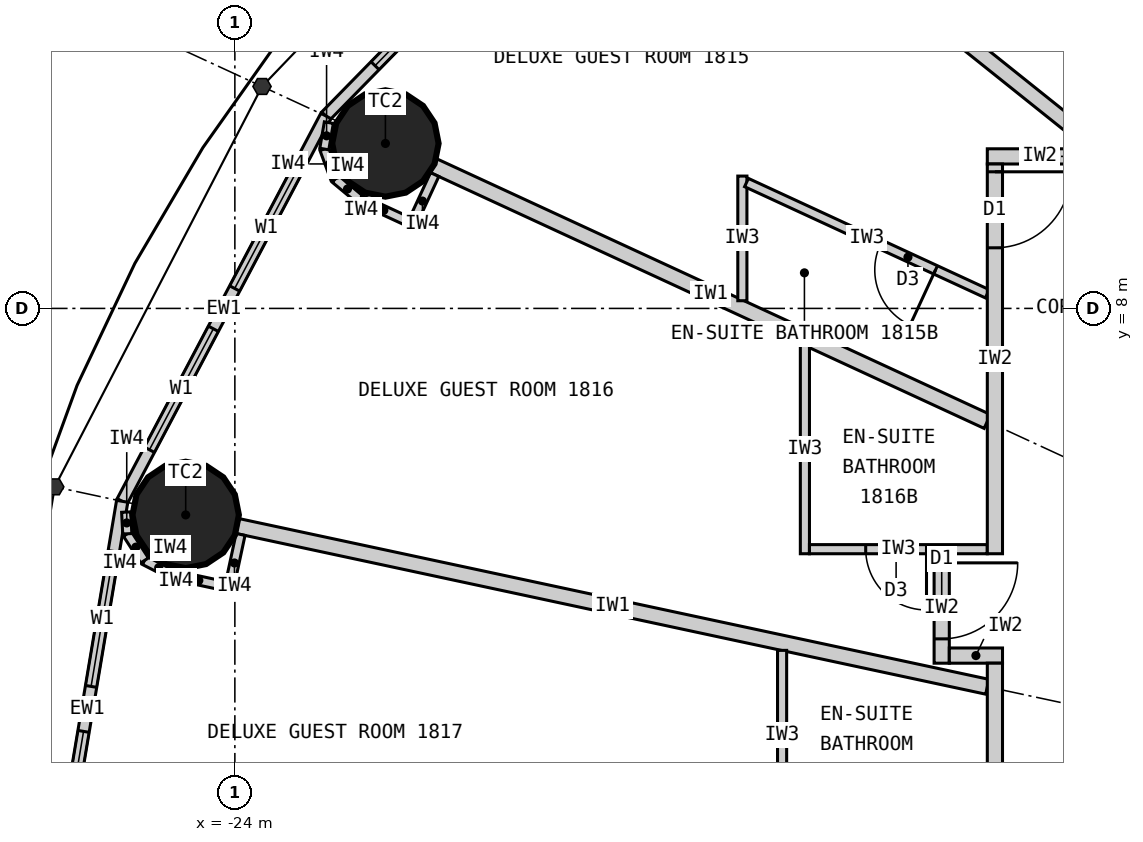
"""IFC4 building model, lengths in metres.
Left out: names, types, materials, properties, quantities, classifications, styles, units other than length and angle.
Written with IfcOpenShell. Run it as: python <this file> out.ifc"""

import sys

from ifc_helpers import new_model, si_unit, direction, frame, frame_2d, origin, origin_2d, place, context, subcontext, project, spatial, rectangle, circle, extrude, element, fill, save


model = new_model("IFC4")
c1 = context("Model", 3, precision=1e-05, world=origin(), true_north=direction((0.0, 1.0)))
c2 = subcontext(c1, "Body", "Model", "MODEL_VIEW")
j1 = project(units=[si_unit("LENGTHUNIT", "METRE"), si_unit("PLANEANGLEUNIT", "RADIAN")], contexts=[c1])
p1 = place(None, origin())
s1 = spatial("IfcSite", under=j1, at=p1, CompositionType="ELEMENT")
p2 = place(p1, origin())
s2 = spatial("IfcBuilding", under=s1, at=p2, CompositionType="ELEMENT")
p3 = place(p2, frame((0.0, 0.0, 73.8)))
s3 = spatial("IfcBuildingStorey", under=s2, at=p3, CompositionType="ELEMENT", Elevation=73.8)
for number, where, z_axis, x_axis in (
    (1, (-22.019, 10.17, 0.0), (0.0, 0.0, 1.0), (1.0, 0.0, 0.0)),
    (2, (-24.647, 5.283, 0.0), (0.0, 0.0, 1.0), (1.0, 0.0, 0.0)),
):
    element("IfcColumn", number, at=place(p3, frame(where, z_axis=z_axis, x_axis=x_axis)), inside=s3, PredefinedType="COLUMN", context=c2, shape_type="SweptSolid", body=[
        extrude(circle(Radius=0.7, at=origin_2d()), origin(), (0.0, 0.0, 1.0), 3.3),
    ])
p4 = place(p3, frame((-18.57, 14.856, 0.0), z_axis=(0.0, 0.0, 1.0), x_axis=(-0.699602905915, -0.714531856557, 0.0)))
e3 = element("IfcWall", 3, at=p4, inside=s3, PredefinedType="ELEMENTEDWALL", context=c2, shape_type="SweptSolid", body=[
    extrude(rectangle(XDim=6.051, YDim=0.15, at=frame_2d((3.025, 0.0))), origin(), (0.0, 0.0, 1.0), 3.12),
])
p5 = place(p4, frame((0.926, 0.0, 0.9)))
e4 = element("IfcOpeningElement", 4, at=p5, cuts=e3, PredefinedType="OPENING", context=c2, shape_type="SweptSolid", body=[
    extrude(rectangle(XDim=1.8, YDim=1.9, at=frame_2d((0.9, 0.95))), frame((0.0, 0.085, 0.0), z_axis=(0.0, -1.0, 0.0), x_axis=(1.0, 0.0, 0.0)), (0.0, 0.0, 1.0), 0.17),
])
p6 = place(p4, frame((3.325, 0.0, 0.9)))
e5 = element("IfcOpeningElement", 5, at=p6, cuts=e3, PredefinedType="OPENING", context=c2, shape_type="SweptSolid", body=[
    extrude(rectangle(XDim=1.8, YDim=1.9, at=frame_2d((0.9, 0.95))), frame((0.0, 0.085, 0.0), z_axis=(0.0, -1.0, 0.0), x_axis=(1.0, 0.0, 0.0)), (0.0, 0.0, 1.0), 0.17),
])
p7 = place(p3, frame((-22.803, 10.532, 0.0), z_axis=(0.0, 0.0, 1.0), x_axis=(-0.467296867008, -0.884100468321, 0.0)))
e6 = element("IfcWall", 6, at=p7, inside=s3, PredefinedType="ELEMENTEDWALL", context=c2, shape_type="SweptSolid", body=[
    extrude(rectangle(XDim=5.734, YDim=0.15, at=frame_2d((2.867, 0.0))), origin(), (0.0, 0.0, 1.0), 3.12),
])
p8 = place(p7, frame((0.767, 0.0, 0.9)))
e7 = element("IfcOpeningElement", 7, at=p8, cuts=e6, PredefinedType="OPENING", context=c2, shape_type="SweptSolid", body=[
    extrude(rectangle(XDim=1.8, YDim=1.9, at=frame_2d((0.9, 0.95))), frame((0.0, 0.085, 0.0), z_axis=(0.0, -1.0, 0.0), x_axis=(1.0, 0.0, 0.0)), (0.0, 0.0, 1.0), 0.17),
])
p9 = place(p7, frame((3.167, 0.0, 0.9)))
e8 = element("IfcOpeningElement", 8, at=p9, cuts=e6, PredefinedType="OPENING", context=c2, shape_type="SweptSolid", body=[
    extrude(rectangle(XDim=1.8, YDim=1.9, at=frame_2d((0.9, 0.95))), frame((0.0, 0.085, 0.0), z_axis=(0.0, -1.0, 0.0), x_axis=(1.0, 0.0, 0.0)), (0.0, 0.0, 1.0), 0.17),
])
p10 = place(p3, frame((-25.482, 5.462, 0.0), z_axis=(0.0, 0.0, 1.0), x_axis=(-0.165642551694, -0.986185857264, 0.0)))
e9 = element("IfcWall", 9, at=p10, inside=s3, PredefinedType="ELEMENTEDWALL", context=c2, shape_type="SweptSolid", body=[
    extrude(rectangle(XDim=5.539, YDim=0.15, at=frame_2d((2.77, 0.0))), origin(), (0.0, 0.0, 1.0), 3.12),
])
p11 = place(p10, frame((0.669, 0.0, 0.9)))
e10 = element("IfcOpeningElement", 10, at=p11, cuts=e9, PredefinedType="OPENING", context=c2, shape_type="SweptSolid", body=[
    extrude(rectangle(XDim=1.8, YDim=1.9, at=frame_2d((0.9, 0.95))), frame((0.0, 0.085, 0.0), z_axis=(0.0, -1.0, 0.0), x_axis=(1.0, 0.0, 0.0)), (0.0, 0.0, 1.0), 0.17),
])
p12 = place(p10, frame((3.07, 0.0, 0.9)))
e11 = element("IfcOpeningElement", 11, at=p12, cuts=e9, PredefinedType="OPENING", context=c2, shape_type="SweptSolid", body=[
    extrude(rectangle(XDim=1.8, YDim=1.9, at=frame_2d((0.9, 0.95))), frame((0.0, 0.085, 0.0), z_axis=(0.0, -1.0, 0.0), x_axis=(1.0, 0.0, 0.0)), (0.0, 0.0, 1.0), 0.17),
])
p13 = place(p3, frame((-12.625, 10.1, 0.0), z_axis=(0.0, 0.0, 1.0), x_axis=(-0.780892451574, 0.624665493744, 0.0)))
e12 = element("IfcWall", 12, at=p13, inside=s3, PredefinedType="PARTITIONING", context=c2, shape_type="SweptSolid", body=[
    extrude(rectangle(XDim=6.045, YDim=0.2, at=frame_2d((3.022, 0.0))), origin(), (0.0, 0.0, 1.0), 2.32),
])
p14 = place(p3, frame((-14.1, 6.512, 0.0), z_axis=(0.0, 0.0, 1.0), x_axis=(-0.907832871056, 0.419332181247, 0.0)))
e13 = element("IfcWall", 13, at=p14, inside=s3, PredefinedType="PARTITIONING", context=c2, shape_type="SweptSolid", body=[
    extrude(rectangle(XDim=8.023, YDim=0.2, at=frame_2d((4.011, 0.0))), origin(), (0.0, 0.0, 1.0), 2.32),
])
p15 = place(p3, frame((-14.1, 3.022, 0.0), z_axis=(0.0, 0.0, 1.0), x_axis=(-0.977790014929, 0.209586943072, 0.0)))
e14 = element("IfcWall", 14, at=p15, inside=s3, PredefinedType="PARTITIONING", context=c2, shape_type="SweptSolid", body=[
    extrude(rectangle(XDim=10.087, YDim=0.2, at=frame_2d((5.043, 0.0))), origin(), (0.0, 0.0, 1.0), 2.32),
])
p16 = place(p3, frame((-17.323, 8.101, 0.0), z_axis=(0.0, 0.0, 1.0), x_axis=(0.0, 1.0, 0.0)))
e15 = element("IfcWall", 15, at=p16, inside=s3, PredefinedType="PARTITIONING", context=c2, shape_type="SweptSolid", body=[
    extrude(rectangle(XDim=1.64, YDim=0.12, at=frame_2d((0.82, 0.0))), origin(), (0.0, 0.0, 1.0), 3.12),
])
p17 = place(p3, frame((-14.1, 8.193, 0.0), z_axis=(0.0, 0.0, 1.0), x_axis=(-0.907836493557, 0.419324338628, 0.0)))
e16 = element("IfcWall", 16, at=p17, inside=s3, PredefinedType="PARTITIONING", context=c2, shape_type="SweptSolid", body=[
    extrude(rectangle(XDim=3.49, YDim=0.12, at=frame_2d((1.745, 0.0))), origin(), (0.0, 0.0, 1.0), 3.12),
])
p18 = place(p17, frame((0.75, 0.0, 0.0)))
e17 = element("IfcOpeningElement", 17, at=p18, cuts=e16, PredefinedType="OPENING", context=c2, shape_type="SweptSolid", body=[
    extrude(rectangle(XDim=0.8, YDim=2.1, at=frame_2d((0.4, 1.05))), frame((0.0, 0.07, 0.0), z_axis=(0.0, -1.0, 0.0), x_axis=(1.0, 0.0, 0.0)), (0.0, 0.0, 1.0), 0.14),
])
p19 = place(p3, frame((-16.5, 7.521, 0.0), z_axis=(0.0, 0.0, 1.0), x_axis=(0.0, -1.0, 0.0)))
e18 = element("IfcWall", 18, at=p19, inside=s3, PredefinedType="PARTITIONING", context=c2, shape_type="SweptSolid", body=[
    extrude(rectangle(XDim=2.749, YDim=0.12, at=frame_2d((1.374, 0.0))), origin(), (0.0, 0.0, 1.0), 3.12),
])
p20 = place(p3, frame((-14.1, 4.833, 0.0), z_axis=(0.0, 0.0, 1.0), x_axis=(-1.0, 0.0, 0.0)))
e19 = element("IfcWall", 19, at=p20, inside=s3, PredefinedType="PARTITIONING", context=c2, shape_type="SweptSolid", body=[
    extrude(rectangle(XDim=2.34, YDim=0.12, at=frame_2d((1.17, 0.0))), origin(), (0.0, 0.0, 1.0), 3.12),
])
p21 = place(p20, frame((0.8, 0.0, 0.0)))
e20 = element("IfcOpeningElement", 20, at=p21, cuts=e19, PredefinedType="OPENING", context=c2, shape_type="SweptSolid", body=[
    extrude(rectangle(XDim=0.8, YDim=2.1, at=frame_2d((0.4, 1.05))), frame((0.0, 0.07, 0.0), z_axis=(0.0, -1.0, 0.0), x_axis=(1.0, 0.0, 0.0)), (0.0, 0.0, 1.0), 0.14),
])
p22 = place(p3, frame((-16.8, 3.501, 0.0), z_axis=(0.0, 0.0, 1.0), x_axis=(0.0, -1.0, 0.0)))
e21 = element("IfcWall", 21, at=p22, inside=s3, PredefinedType="PARTITIONING", context=c2, shape_type="SweptSolid", body=[
    extrude(rectangle(XDim=2.219, YDim=0.12, at=frame_2d((1.109, 0.0))), origin(), (0.0, 0.0, 1.0), 3.12),
])
p23 = place(p3, frame((-14.7, 4.772, 0.0), z_axis=(0.0, 0.0, 1.0), x_axis=(0.0, -1.0, 0.0)))
e22 = element("IfcWall", 22, at=p23, inside=s3, PredefinedType="PARTITIONING", context=c2, shape_type="SweptSolid", body=[
    extrude(rectangle(XDim=1.44, YDim=0.2, at=frame_2d((0.72, 0.0))), origin(), (0.0, 0.0, 1.0), 3.12),
])
p24 = place(p23, frame((0.12, 0.0, 0.0)))
e23 = element("IfcOpeningElement", 23, at=p24, cuts=e22, PredefinedType="OPENING", context=c2, shape_type="SweptSolid", body=[
    extrude(rectangle(XDim=1.0, YDim=2.2, at=frame_2d((0.5, 1.1))), frame((0.0, 0.11, 0.0), z_axis=(0.0, -1.0, 0.0), x_axis=(1.0, 0.0, 0.0)), (0.0, 0.0, 1.0), 0.22),
])
p25 = place(p3, frame((-13.9, 3.433, 0.0), z_axis=(0.0, 0.0, 1.0), x_axis=(-1.0, 0.0, 0.0)))
e24 = element("IfcWall", 24, at=p25, inside=s3, PredefinedType="PARTITIONING", context=c2, shape_type="SweptSolid", body=[
    extrude(rectangle(XDim=0.7, YDim=0.2, at=frame_2d((0.35, 0.0))), origin(), (0.0, 0.0, 1.0), 2.32),
])
p26 = place(p3, frame((-14.1, 10.0, 0.0), z_axis=(0.0, 0.0, 1.0), x_axis=(1.0, 0.0, 0.0)))
e25 = element("IfcWall", 25, at=p26, inside=s3, PredefinedType="PARTITIONING", context=c2, shape_type="SweptSolid", body=[
    extrude(rectangle(XDim=2.481, YDim=0.2, at=frame_2d((1.24, 0.0))), origin(), (0.0, 0.0, 1.0), 3.12),
])
p27 = place(p3, frame((-14.0, 9.9, 0.0), z_axis=(0.0, 0.0, 1.0), x_axis=(0.0, -1.0, 0.0)))
e26 = element("IfcWall", 26, at=p27, inside=s3, PredefinedType="PARTITIONING", context=c2, shape_type="SweptSolid", body=[
    extrude(rectangle(XDim=5.127, YDim=0.2, at=frame_2d((2.564, 0.0))), origin(), (0.0, 0.0, 1.0), 3.12),
])
p28 = place(p27, frame((0.103, 0.0, 0.0)))
e27 = element("IfcOpeningElement", 27, at=p28, cuts=e26, PredefinedType="OPENING", context=c2, shape_type="SweptSolid", body=[
    extrude(rectangle(XDim=1.0, YDim=2.2, at=frame_2d((0.5, 1.1))), frame((0.0, 0.11, 0.0), z_axis=(0.0, -1.0, 0.0), x_axis=(1.0, 0.0, 0.0)), (0.0, 0.0, 1.0), 0.22),
])
p29 = place(p3, frame((-14.0, 3.333, 0.0), z_axis=(0.0, 0.0, 1.0), x_axis=(0.0, -1.0, 0.0)))
e28 = element("IfcWall", 28, at=p29, inside=s3, PredefinedType="PARTITIONING", context=c2, shape_type="SweptSolid", body=[
    extrude(rectangle(XDim=6.665, YDim=0.2, at=frame_2d((3.333, 0.0))), origin(), (0.0, 0.0, 1.0), 3.12),
])
p30 = place(p29, frame((2.15, 0.0, 0.0)))
e29 = element("IfcOpeningElement", 29, at=p30, cuts=e28, PredefinedType="OPENING", context=c2, shape_type="SweptSolid", body=[
    extrude(rectangle(XDim=1.0, YDim=2.2, at=frame_2d((0.5, 1.1))), frame((0.0, 0.11, 0.0), z_axis=(0.0, -1.0, 0.0), x_axis=(1.0, 0.0, 0.0)), (0.0, 0.0, 1.0), 0.22),
])
p31 = place(p29, frame((5.173, 0.0, 0.0)))
e30 = element("IfcOpeningElement", 30, at=p31, cuts=e28, PredefinedType="OPENING", context=c2, shape_type="SweptSolid", body=[
    extrude(rectangle(XDim=1.0, YDim=2.2, at=frame_2d((0.5, 1.1))), frame((0.0, 0.11, 0.0), z_axis=(0.0, -1.0, 0.0), x_axis=(1.0, 0.0, 0.0)), (0.0, 0.0, 1.0), 0.22),
])
p32 = place(p3, frame((-21.371, 9.761, 0.0), z_axis=(0.0, 0.0, 1.0), x_axis=(-0.419259891039, -0.907866258744, 0.0)))
e31 = element("IfcWall", 31, at=p32, inside=s3, PredefinedType="PARTITIONING", context=c2, shape_type="SweptSolid", body=[
    extrude(rectangle(XDim=0.768, YDim=0.12, at=frame_2d((0.384, 0.0))), origin(), (0.0, 0.0, 1.0), 3.12),
])
p33 = place(p3, frame((-21.722, 9.144, 0.0), z_axis=(0.0, 0.0, 1.0), x_axis=(-0.907877701396, 0.419235112208, 0.0)))
e32 = element("IfcWall", 32, at=p33, inside=s3, PredefinedType="PARTITIONING", context=c2, shape_type="SweptSolid", body=[
    extrude(rectangle(XDim=0.7, YDim=0.12, at=frame_2d((0.35, 0.0))), origin(), (0.0, 0.0, 1.0), 3.12),
])
p34 = place(p3, frame((-22.358, 9.437, 0.0), z_axis=(0.0, 0.0, 1.0), x_axis=(-0.768412687942, 0.639954639806, 0.0)))
e33 = element("IfcWall", 33, at=p34, inside=s3, PredefinedType="PARTITIONING", context=c2, shape_type="SweptSolid", body=[
    extrude(rectangle(XDim=0.418, YDim=0.12, at=frame_2d((0.209, 0.0))), origin(), (0.0, 0.0, 1.0), 3.12),
])
p35 = place(p3, frame((-22.679, 9.705, 0.0), z_axis=(0.0, 0.0, 1.0), x_axis=(-0.345164001646, 0.938542386879, 0.0)))
e34 = element("IfcWall", 34, at=p35, inside=s3, PredefinedType="PARTITIONING", context=c2, shape_type="SweptSolid", body=[
    extrude(rectangle(XDim=0.418, YDim=0.12, at=frame_2d((0.209, 0.0))), origin(), (0.0, 0.0, 1.0), 3.12),
])
p36 = place(p3, frame((-22.823, 10.097, 0.0), z_axis=(0.0, 0.0, 1.0), x_axis=(0.169674995186, 0.985500074079, 0.0)))
e35 = element("IfcWall", 35, at=p36, inside=s3, PredefinedType="PARTITIONING", context=c2, shape_type="SweptSolid", body=[
    extrude(rectangle(XDim=0.353, YDim=0.12, at=frame_2d((0.176, 0.0))), origin(), (0.0, 0.0, 1.0), 3.12),
])
p37 = place(p3, frame((-23.925, 5.026, 0.0), z_axis=(0.0, 0.0, 1.0), x_axis=(-0.209681192172, -0.977769808109, 0.0)))
e36 = element("IfcWall", 36, at=p37, inside=s3, PredefinedType="PARTITIONING", context=c2, shape_type="SweptSolid", body=[
    extrude(rectangle(XDim=0.767, YDim=0.12, at=frame_2d((0.384, 0.0))), origin(), (0.0, 0.0, 1.0), 3.12),
])
p38 = place(p3, frame((-24.132, 4.347, 0.0), z_axis=(0.0, 0.0, 1.0), x_axis=(-0.977776882509, 0.209648200638, 0.0)))
e37 = element("IfcWall", 37, at=p38, inside=s3, PredefinedType="PARTITIONING", context=c2, shape_type="SweptSolid", body=[
    extrude(rectangle(XDim=0.7, YDim=0.12, at=frame_2d((0.35, 0.0))), origin(), (0.0, 0.0, 1.0), 3.12),
])
for number, where, z_axis, x_axis in (
    (38, (-24.816, 4.494, 0.0), (0.0, 0.0, 1.0), (-0.89, 0.455, 0.0)),
    (39, (-25.188, 4.684, 0.0), (0.0, 0.0, 1.0), (-0.543, 0.84, 0.0)),
):
    element("IfcWall", number, at=place(p3, frame(where, z_axis=z_axis, x_axis=x_axis)), inside=s3, PredefinedType="PARTITIONING", context=c2, shape_type="SweptSolid", body=[
        extrude(rectangle(XDim=0.418, YDim=0.12, at=frame_2d((0.209, 0.0))), origin(), (0.0, 0.0, 1.0), 3.12),
    ])
p39 = place(p3, frame((-25.416, 5.035, 0.0), z_axis=(0.0, 0.0, 1.0), x_axis=(-0.050406329159, 0.998728793007, 0.0)))
e40 = element("IfcWall", 40, at=p39, inside=s3, PredefinedType="PARTITIONING", context=c2, shape_type="SweptSolid", body=[
    extrude(rectangle(XDim=0.286, YDim=0.12, at=frame_2d((0.143, 0.0))), origin(), (0.0, 0.0, 1.0), 3.12),
])
p40 = place(p6, origin())
e41 = element("IfcWindow", 41, at=p40, inside=s3, PartitioningType="SINGLE_PANEL", PredefinedType="WINDOW", context=c2, shape_type="SweptSolid", body=[
    extrude(rectangle(XDim=1.8, YDim=1.9, at=frame_2d((0.9, 0.95))), frame((0.0, 0.03, 0.0), z_axis=(0.0, -1.0, 0.0), x_axis=(1.0, 0.0, 0.0)), (0.0, 0.0, 1.0), 0.06),
])
fill(e5, e41)
p41 = place(p8, origin())
e42 = element("IfcWindow", 42, at=p41, inside=s3, PartitioningType="SINGLE_PANEL", PredefinedType="WINDOW", context=c2, shape_type="SweptSolid", body=[
    extrude(rectangle(XDim=1.8, YDim=1.9, at=frame_2d((0.9, 0.95))), frame((0.0, 0.03, 0.0), z_axis=(0.0, -1.0, 0.0), x_axis=(1.0, 0.0, 0.0)), (0.0, 0.0, 1.0), 0.06),
])
fill(e7, e42)
p42 = place(p9, origin())
e43 = element("IfcWindow", 43, at=p42, inside=s3, PartitioningType="SINGLE_PANEL", PredefinedType="WINDOW", context=c2, shape_type="SweptSolid", body=[
    extrude(rectangle(XDim=1.8, YDim=1.9, at=frame_2d((0.9, 0.95))), frame((0.0, 0.03, 0.0), z_axis=(0.0, -1.0, 0.0), x_axis=(1.0, 0.0, 0.0)), (0.0, 0.0, 1.0), 0.06),
])
fill(e8, e43)
p43 = place(p11, origin())
e44 = element("IfcWindow", 44, at=p43, inside=s3, PartitioningType="SINGLE_PANEL", PredefinedType="WINDOW", context=c2, shape_type="SweptSolid", body=[
    extrude(rectangle(XDim=1.8, YDim=1.9, at=frame_2d((0.9, 0.95))), frame((0.0, 0.03, 0.0), z_axis=(0.0, -1.0, 0.0), x_axis=(1.0, 0.0, 0.0)), (0.0, 0.0, 1.0), 0.06),
])
fill(e10, e44)
p44 = place(p12, origin())
e45 = element("IfcWindow", 45, at=p44, inside=s3, PartitioningType="SINGLE_PANEL", PredefinedType="WINDOW", context=c2, shape_type="SweptSolid", body=[
    extrude(rectangle(XDim=1.8, YDim=1.9, at=frame_2d((0.9, 0.95))), frame((0.0, 0.03, 0.0), z_axis=(0.0, -1.0, 0.0), x_axis=(1.0, 0.0, 0.0)), (0.0, 0.0, 1.0), 0.06),
])
fill(e11, e45)
p45 = place(p18, origin())
e46 = element("IfcDoor", 46, at=p45, inside=s3, OperationType="SINGLE_SWING_LEFT", PredefinedType="DOOR", context=c2, shape_type="SweptSolid", body=[
    extrude(rectangle(XDim=0.8, YDim=2.1, at=frame_2d((0.4, 1.05))), frame((0.0, 0.025, 0.0), z_axis=(0.0, -1.0, 0.0), x_axis=(1.0, 0.0, 0.0)), (0.0, 0.0, 1.0), 0.05),
])
fill(e17, e46)
p46 = place(p28, origin())
e47 = element("IfcDoor", 47, at=p46, inside=s3, OperationType="SINGLE_SWING_LEFT", PredefinedType="DOOR", context=c2, shape_type="SweptSolid", body=[
    extrude(rectangle(XDim=1.0, YDim=2.2, at=frame_2d((0.5, 1.1))), frame((0.0, 0.025, 0.0), z_axis=(0.0, -1.0, 0.0), x_axis=(1.0, 0.0, 0.0)), (0.0, 0.0, 1.0), 0.05),
])
fill(e27, e47)
p47 = place(p21, origin())
e48 = element("IfcDoor", 48, at=p47, inside=s3, OperationType="SINGLE_SWING_LEFT", PredefinedType="DOOR", context=c2, shape_type="SweptSolid", body=[
    extrude(rectangle(XDim=0.8, YDim=2.1, at=frame_2d((0.4, 1.05))), frame((0.0, 0.025, 0.0), z_axis=(0.0, -1.0, 0.0), x_axis=(1.0, 0.0, 0.0)), (0.0, 0.0, 1.0), 0.05),
])
fill(e20, e48)
p48 = place(p24, origin())
e49 = element("IfcDoor", 49, at=p48, inside=s3, OperationType="SINGLE_SWING_LEFT", PredefinedType="DOOR", context=c2, shape_type="SweptSolid", body=[
    extrude(rectangle(XDim=1.0, YDim=2.2, at=frame_2d((0.5, 1.1))), frame((0.0, 0.025, 0.0), z_axis=(0.0, -1.0, 0.0), x_axis=(1.0, 0.0, 0.0)), (0.0, 0.0, 1.0), 0.05),
])
fill(e23, e49)
save(model, sys.argv[1])
